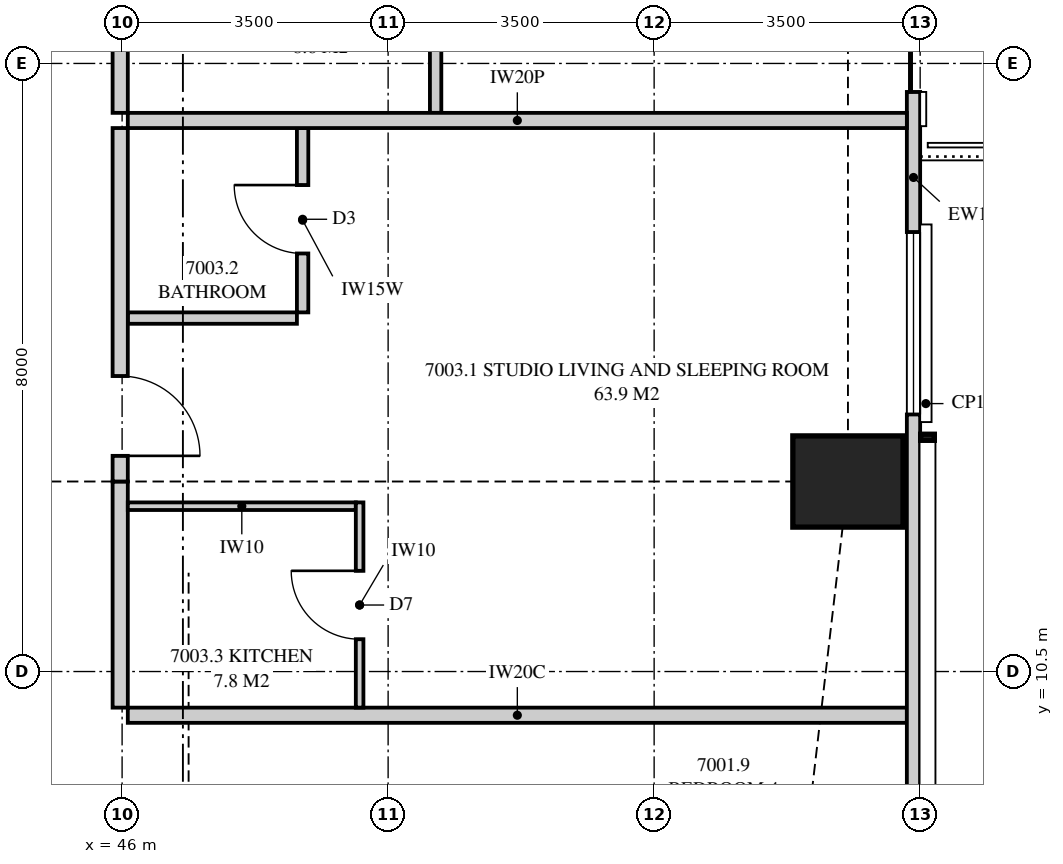
"""IFC4 building model, lengths in metres.
Left out: names, types, materials, properties, quantities, classifications, styles, units other than length and angle.
Written with IfcOpenShell. Run it as: python <this file> out.ifc"""

import sys

from ifc_helpers import new_model, si_unit, direction, frame, frame_2d, origin, origin_2d, place, context, subcontext, project, spatial, polyline, rectangle, outline, extrude, element, fill, save


model = new_model("IFC4")
c1 = context("Model", 3, precision=1e-05, world=origin(), true_north=direction((0.0, 1.0)))
c2 = subcontext(c1, "Body", "Model", "MODEL_VIEW")
j1 = project(units=[si_unit("LENGTHUNIT", "METRE"), si_unit("PLANEANGLEUNIT", "RADIAN")], contexts=[c1])
p1 = place(None, origin())
s1 = spatial("IfcSite", under=j1, at=p1, CompositionType="ELEMENT")
p2 = place(p1, origin())
s2 = spatial("IfcBuilding", under=s1, at=p2, CompositionType="ELEMENT")
p3 = place(p2, frame((0.0, 0.0, 256.45)))
s3 = spatial("IfcBuildingStorey", under=s2, at=p3, CompositionType="ELEMENT", Elevation=256.45)
p4 = place(p3, frame((55.55, 13.0, 0.0), z_axis=(0.0, 0.0, 1.0), x_axis=(1.0, 0.0, 0.0)))
e1 = element("IfcColumn", 1, at=p4, inside=s3, PredefinedType="COLUMN", context=c2, shape_type="SweptSolid", body=[
    extrude(rectangle(XDim=1.45, YDim=1.2, at=origin_2d()), origin(), (0.0, 0.0, 1.0), 3.5),
])
p5 = place(p3, frame((56.413, 3.051, 0.0), z_axis=(0.0, 0.0, 1.0), x_axis=(0.0, 1.0, 0.0)))
e2 = element("IfcWall", 2, at=p5, inside=s3, PredefinedType="SOLIDWALL", context=c2, shape_type="SweptSolid", body=[
    extrude(outline(polyline([(0.0, 0.0), (27.897, 0.0), (27.897, 3.26), (22.157, 3.26), (22.157, 2.3), (22.092, 2.3), (22.092, 3.26), (21.949, 3.26), (21.949, 2.3), (9.949, 2.3), (9.949, 3.26), (9.858, 3.26), (9.858, 2.3), (9.688, 2.3), (9.688, 3.26), (0.0, 3.26), (0.0, 0.0)])), frame((0.0, 0.087, 0.0), z_axis=(0.0, -1.0, 0.0), x_axis=(1.0, 0.0, 0.0)), (0.0, 0.0, 1.0), 0.175),
])
p6 = place(p5, frame((10.831, 0.0, 0.4)))
e3 = element("IfcOpeningElement", 3, at=p6, cuts=e2, PredefinedType="OPENING", context=c2, shape_type="SweptSolid", body=[
    extrude(rectangle(XDim=2.4, YDim=1.85, at=frame_2d((1.2, 0.925))), frame((0.0, 0.097, 0.0), z_axis=(0.0, -1.0, 0.0), x_axis=(1.0, 0.0, 0.0)), (0.0, 0.0, 1.0), 0.195),
])
p7 = place(p5, frame((15.074, 0.0, 0.0)))
e4 = element("IfcOpeningElement", 4, at=p7, cuts=e2, PredefinedType="OPENING", context=c2, shape_type="SweptSolid", body=[
    extrude(rectangle(XDim=1.8, YDim=2.25, at=frame_2d((0.9, 1.125))), frame((0.0, 0.097, 0.0), z_axis=(0.0, -1.0, 0.0), x_axis=(1.0, 0.0, 0.0)), (0.0, 0.0, 1.0), 0.195),
])
p8 = place(p5, frame((18.699, 0.0, 0.4)))
e5 = element("IfcOpeningElement", 5, at=p8, cuts=e2, PredefinedType="OPENING", context=c2, shape_type="SweptSolid", body=[
    extrude(rectangle(XDim=2.4, YDim=1.85, at=frame_2d((1.2, 0.925))), frame((0.0, 0.097, 0.0), z_axis=(0.0, -1.0, 0.0), x_axis=(1.0, 0.0, 0.0)), (0.0, 0.0, 1.0), 0.195),
])
p9 = place(p3, frame((46.075, 9.925, 0.0), z_axis=(0.0, 0.0, 1.0), x_axis=(1.0, 0.0, 0.0)))
e6 = element("IfcWall", 6, at=p9, inside=s3, PredefinedType="PARTITIONING", context=c2, shape_type="SweptSolid", body=[
    extrude(outline(polyline([(0.0, 0.0), (10.25, 0.0), (10.25, 3.26), (10.033, 3.26), (10.033, 2.3), (8.201, 2.3), (8.201, 3.26), (2.11, 3.26), (2.11, 2.66), (0.0, 2.66), (0.0, 3.26), (0.0, 0.0)])), frame((0.0, 0.1, 0.0), z_axis=(0.0, -1.0, 0.0), x_axis=(1.0, 0.0, 0.0)), (0.0, 0.0, 1.0), 0.2),
])
p10 = place(p3, frame((56.325, 17.75, 0.0), z_axis=(0.0, 0.0, 1.0), x_axis=(-1.0, 0.0, 0.0)))
e7 = element("IfcWall", 7, at=p10, inside=s3, PredefinedType="PARTITIONING", context=c2, shape_type="SweptSolid", body=[
    extrude(outline(polyline([(0.0, 0.0), (10.25, 0.0), (10.25, 3.26), (10.25, 2.66), (1.685, 2.66), (1.685, 2.3), (0.0, 2.3), (0.0, 3.26), (0.0, 0.0)])), frame((0.0, 0.1, 0.0), z_axis=(0.0, -1.0, 0.0), x_axis=(1.0, 0.0, 0.0)), (0.0, 0.0, 1.0), 0.2),
])
p11 = place(p3, frame((45.975, 10.025, 0.0), z_axis=(0.0, 0.0, 1.0), x_axis=(0.0, 1.0, 0.0)))
e8 = element("IfcWall", 8, at=p11, inside=s3, PredefinedType="PARTITIONING", context=c2, shape_type="SweptSolid", body=[
    extrude(rectangle(XDim=2.975, YDim=0.2, at=frame_2d((1.488, 0.0))), origin(), (0.0, 0.0, 1.0), 2.66),
])
p12 = place(p3, frame((45.975, 13.0, 0.0), z_axis=(0.0, 0.0, 1.0), x_axis=(0.0, 1.0, 0.0)))
e9 = element("IfcWall", 9, at=p12, inside=s3, PredefinedType="PARTITIONING", context=c2, shape_type="SweptSolid", body=[
    extrude(outline(polyline([(0.0, 0.0), (4.65, 0.0), (4.65, 2.66), (4.44, 2.66), (4.44, 3.26), (1.31, 3.26), (1.31, 2.66), (0.0, 2.66), (0.0, 0.0)])), frame((0.0, 0.1, 0.0), z_axis=(0.0, -1.0, 0.0), x_axis=(1.0, 0.0, 0.0)), (0.0, 0.0, 1.0), 0.2),
])
p13 = place(p12, frame((0.337, 0.0, 0.0)))
e10 = element("IfcOpeningElement", 10, at=p13, cuts=e9, PredefinedType="OPENING", context=c2, shape_type="SweptSolid", body=[
    extrude(rectangle(XDim=1.05, YDim=2.2, at=frame_2d((0.525, 1.1))), frame((0.0, 0.11, 0.0), z_axis=(0.0, -1.0, 0.0), x_axis=(1.0, 0.0, 0.0)), (0.0, 0.0, 1.0), 0.22),
])
p14 = place(p3, frame((48.375, 15.225, 0.0), z_axis=(0.0, 0.0, 1.0), x_axis=(0.0, 1.0, 0.0)))
e11 = element("IfcWall", 11, at=p14, inside=s3, PredefinedType="PLUMBINGWALL", context=c2, shape_type="SweptSolid", body=[
    extrude(outline(polyline([(0.0, 0.0), (2.425, 0.0), (2.425, 3.26), (2.425, 2.66), (2.24, 2.66), (2.24, 3.26), (0.0, 3.26), (0.0, 0.0)])), frame((0.0, 0.075, 0.0), z_axis=(0.0, -1.0, 0.0), x_axis=(1.0, 0.0, 0.0)), (0.0, 0.0, 1.0), 0.15),
])
p15 = place(p14, frame((0.775, 0.0, 0.0)))
e12 = element("IfcOpeningElement", 12, at=p15, cuts=e11, PredefinedType="OPENING", context=c2, shape_type="SweptSolid", body=[
    extrude(rectangle(XDim=0.9, YDim=2.1, at=frame_2d((0.45, 1.05))), frame((0.0, 0.085, 0.0), z_axis=(0.0, -1.0, 0.0), x_axis=(1.0, 0.0, 0.0)), (0.0, 0.0, 1.0), 0.17),
])
p16 = place(p3, frame((48.3, 15.15, 0.0), z_axis=(0.0, 0.0, 1.0), x_axis=(-1.0, 0.0, 0.0)))
e13 = element("IfcWall", 13, at=p16, inside=s3, PredefinedType="PLUMBINGWALL", context=c2, shape_type="SweptSolid", body=[
    extrude(rectangle(XDim=2.225, YDim=0.15, at=frame_2d((1.113, 0.0))), origin(), (0.0, 0.0, 1.0), 3.26),
])
p17 = place(p3, frame((45.975, 17.85, 0.0), z_axis=(0.0, 0.0, 1.0), x_axis=(0.0, 1.0, 0.0)))
e14 = element("IfcWall", 14, at=p17, inside=s3, PredefinedType="PARTITIONING", context=c2, shape_type="SweptSolid", body=[
    extrude(outline(polyline([(0.0, 0.0), (7.15, 0.0), (7.15, 2.66), (5.84, 2.66), (5.84, 3.26), (2.21, 3.26), (2.21, 2.66), (0.0, 2.66), (0.0, 0.0)])), frame((0.0, 0.1, 0.0), z_axis=(0.0, -1.0, 0.0), x_axis=(1.0, 0.0, 0.0)), (0.0, 0.0, 1.0), 0.2),
])
p18 = place(p17, frame((4.062, 0.0, 0.0)))
e15 = element("IfcOpeningElement", 15, at=p18, cuts=e14, PredefinedType="OPENING", context=c2, shape_type="SweptSolid", body=[
    extrude(rectangle(XDim=1.05, YDim=2.2, at=frame_2d((0.525, 1.1))), frame((0.0, 0.11, 0.0), z_axis=(0.0, -1.0, 0.0), x_axis=(1.0, 0.0, 0.0)), (0.0, 0.0, 1.0), 0.22),
])
p19 = place(p3, frame((50.125, 17.85, 0.0), z_axis=(0.0, 0.0, 1.0), x_axis=(0.0, 1.0, 0.0)))
e16 = element("IfcWall", 16, at=p19, inside=s3, PredefinedType="PLUMBINGWALL", context=c2, shape_type="SweptSolid", body=[
    extrude(outline(polyline([(0.0, 0.0), (3.45, 0.0), (3.45, 3.26), (2.185, 3.26), (2.185, 2.66), (0.0, 2.66), (0.0, 3.26), (0.0, 0.0)])), frame((0.0, 0.075, 0.0), z_axis=(0.0, -1.0, 0.0), x_axis=(1.0, 0.0, 0.0)), (0.0, 0.0, 1.0), 0.15),
])
p20 = place(p19, frame((2.15, 0.0, 0.0)))
e17 = element("IfcOpeningElement", 17, at=p20, cuts=e16, PredefinedType="OPENING", context=c2, shape_type="SweptSolid", body=[
    extrude(rectangle(XDim=0.9, YDim=2.1, at=frame_2d((0.45, 1.05))), frame((0.0, 0.085, 0.0), z_axis=(0.0, -1.0, 0.0), x_axis=(1.0, 0.0, 0.0)), (0.0, 0.0, 1.0), 0.17),
])
p21 = place(p3, frame((49.125, 10.025, 0.0), z_axis=(0.0, 0.0, 1.0), x_axis=(0.0, 1.0, 0.0)))
e18 = element("IfcWall", 18, at=p21, inside=s3, PredefinedType="PARTITIONING", context=c2, shape_type="SweptSolid", body=[
    extrude(outline(polyline([(0.0, 0.0), (2.7, 0.0), (2.7, 3.26), (2.7, 2.66), (1.715, 2.66), (1.715, 3.26), (0.0, 3.26), (0.0, 0.0)])), frame((0.0, 0.05, 0.0), z_axis=(0.0, -1.0, 0.0), x_axis=(1.0, 0.0, 0.0)), (0.0, 0.0, 1.0), 0.1),
])
p22 = place(p21, frame((0.9, 0.0, 0.0)))
e19 = element("IfcOpeningElement", 19, at=p22, cuts=e18, PredefinedType="OPENING", context=c2, shape_type="SweptSolid", body=[
    extrude(rectangle(XDim=0.9, YDim=2.1, at=frame_2d((0.45, 1.05))), frame((0.0, 0.06, 0.0), z_axis=(0.0, -1.0, 0.0), x_axis=(1.0, 0.0, 0.0)), (0.0, 0.0, 1.0), 0.12),
])
p23 = place(p3, frame((46.075, 12.675, 0.0), z_axis=(0.0, 0.0, 1.0), x_axis=(1.0, 0.0, 0.0)))
e20 = element("IfcWall", 20, at=p23, inside=s3, PredefinedType="PARTITIONING", context=c2, shape_type="SweptSolid", body=[
    extrude(outline(polyline([(0.0, 0.0), (3.0, 0.0), (3.0, 3.26), (3.0, 2.66), (2.06, 2.66), (0.0, 2.66), (0.0, 3.26), (0.0, 0.0)])), frame((0.0, 0.05, 0.0), z_axis=(0.0, -1.0, 0.0), x_axis=(1.0, 0.0, 0.0)), (0.0, 0.0, 1.0), 0.1),
])
p24 = place(p6, origin())
e21 = element("IfcWindow", 21, at=p24, inside=s3, PartitioningType="SINGLE_PANEL", PredefinedType="WINDOW", context=c2, shape_type="SweptSolid", body=[
    extrude(rectangle(XDim=2.4, YDim=1.85, at=frame_2d((1.2, 0.925))), frame((0.0, 0.03, 0.0), z_axis=(0.0, -1.0, 0.0), x_axis=(1.0, 0.0, 0.0)), (0.0, 0.0, 1.0), 0.06),
])
fill(e3, e21)
p25 = place(p7, origin())
e22 = element("IfcDoor", 22, at=p25, inside=s3, OperationType="SLIDING_TO_LEFT", PredefinedType="DOOR", context=c2, shape_type="SweptSolid", body=[
    extrude(rectangle(XDim=1.8, YDim=2.25, at=frame_2d((0.9, 1.125))), frame((0.0, 0.025, 0.0), z_axis=(0.0, -1.0, 0.0), x_axis=(1.0, 0.0, 0.0)), (0.0, 0.0, 1.0), 0.05),
])
fill(e4, e22)
p26 = place(p13, frame((1.05, 0.0, 0.0), z_axis=(0.0, 0.0, 1.0), x_axis=(-1.0, 0.0, 0.0)))
e23 = element("IfcDoor", 23, at=p26, inside=s3, OperationType="SINGLE_SWING_RIGHT", PredefinedType="DOOR", context=c2, shape_type="SweptSolid", body=[
    extrude(rectangle(XDim=1.05, YDim=2.2, at=frame_2d((0.525, 1.1))), frame((0.0, 0.025, 0.0), z_axis=(0.0, -1.0, 0.0), x_axis=(1.0, 0.0, 0.0)), (0.0, 0.0, 1.0), 0.05),
])
fill(e10, e23)
p27 = place(p15, origin())
e24 = element("IfcDoor", 24, at=p27, inside=s3, OperationType="SINGLE_SWING_RIGHT", PredefinedType="DOOR", context=c2, shape_type="SweptSolid", body=[
    extrude(rectangle(XDim=0.9, YDim=2.1, at=frame_2d((0.45, 1.05))), frame((0.0, 0.025, 0.0), z_axis=(0.0, -1.0, 0.0), x_axis=(1.0, 0.0, 0.0)), (0.0, 0.0, 1.0), 0.05),
])
fill(e12, e24)
p28 = place(p22, origin())
e25 = element("IfcDoor", 25, at=p28, inside=s3, OperationType="SINGLE_SWING_RIGHT", PredefinedType="DOOR", context=c2, shape_type="SweptSolid", body=[
    extrude(rectangle(XDim=0.9, YDim=2.1, at=frame_2d((0.45, 1.05))), frame((0.0, 0.025, 0.0), z_axis=(0.0, -1.0, 0.0), x_axis=(1.0, 0.0, 0.0)), (0.0, 0.0, 1.0), 0.05),
])
fill(e19, e25)
save(model, sys.argv[1])
